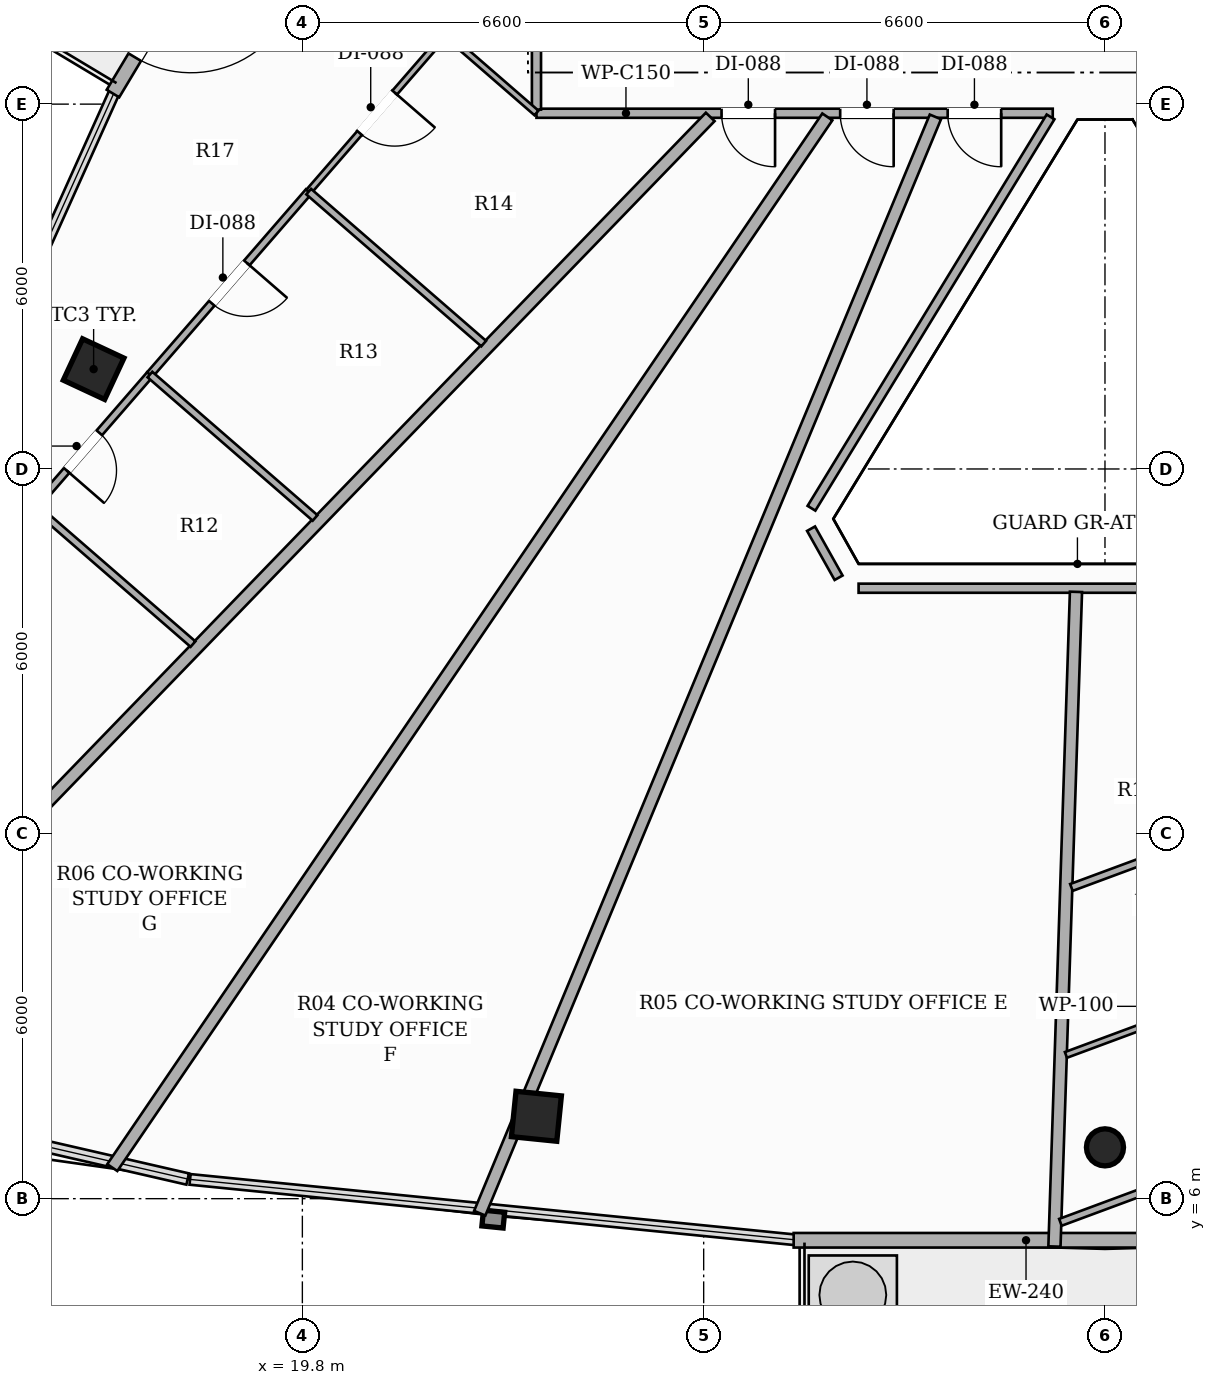
"""IFC4 building model, lengths in metres.
Left out: names, types, materials, properties, quantities, classifications, styles, units other than length and angle.
Written with IfcOpenShell. Run it as: python <this file> out.ifc"""

import sys

from ifc_helpers import new_model, si_unit, direction, frame, frame_2d, origin, origin_2d, place, context, subcontext, project, spatial, rectangle, hollow_rectangle, hollow_circle, extrude, element, fill, save


model = new_model("IFC4")
c1 = context("Model", 3, precision=1e-05, world=origin(), true_north=direction((0.0, 1.0)))
c2 = subcontext(c1, "Body", "Model", "MODEL_VIEW")
j1 = project(units=[si_unit("LENGTHUNIT", "METRE"), si_unit("PLANEANGLEUNIT", "RADIAN")], contexts=[c1])
p1 = place(None, origin())
s1 = spatial("IfcSite", under=j1, at=p1, CompositionType="ELEMENT")
p2 = place(p1, origin())
s2 = spatial("IfcBuilding", under=s1, at=p2, CompositionType="ELEMENT")
p3 = place(p2, frame((0.0, 0.0, 240.35)))
s3 = spatial("IfcBuildingStorey", under=s2, at=p3, CompositionType="ELEMENT", Elevation=240.35)
for number, where, z_axis, x_axis in (
    (1, (16.367, 19.642, 0.0), (0.0, 0.0, 1.0), (0.423, 0.906, 0.0)),
    (2, (23.649, 7.355, 0.0), (0.0, 0.0, 1.0), (-0.995, 0.101, 0.0)),
):
    element("IfcColumn", number, at=place(p3, frame(where, z_axis=z_axis, x_axis=x_axis)), inside=s3, PredefinedType="COLUMN", context=c2, shape_type="SweptSolid", body=[
        extrude(hollow_rectangle(XDim=0.75, YDim=0.75, WallThickness=0.025, at=origin_2d()), origin(), (0.0, 0.0, 1.0), 3.3),
    ])
p4 = place(p3, frame((33.0, 6.844, 0.0), z_axis=(0.0, 0.0, 1.0), x_axis=(1.0, 0.0, 0.0)))
e3 = element("IfcColumn", 3, at=p4, inside=s3, PredefinedType="COLUMN", context=c2, shape_type="SweptSolid", body=[
    extrude(hollow_circle(Radius=0.305, WallThickness=0.016, at=origin_2d()), origin(), (0.0, 0.0, 1.0), 3.3),
])
p5 = place(p3, frame((21.775, 32.66, 0.0), z_axis=(0.0, 0.0, 1.0), x_axis=(-0.514372387577, -0.857566934354, 0.0)))
e4 = element("IfcWall", 4, at=p5, inside=s3, PredefinedType="SOLIDWALL", context=c2, shape_type="SweptSolid", body=[
    extrude(rectangle(XDim=9.895, YDim=0.24, at=frame_2d((4.948, 0.0))), origin(), (0.0, 0.0, 1.0), 2.624),
])
p6 = place(p5, frame((7.398, 0.0, 0.0)))
e5 = element("IfcOpeningElement", 5, at=p6, cuts=e4, PredefinedType="OPENING", context=c2, shape_type="SweptSolid", body=[
    extrude(rectangle(XDim=1.8, YDim=2.2, at=frame_2d((0.9, 1.1))), frame((0.0, 0.13, 0.0), z_axis=(0.0, -1.0, 0.0), x_axis=(1.0, 0.0, 0.0)), (0.0, 0.0, 1.0), 0.26),
])
p7 = place(p3, frame((27.88, 5.316, 0.0), z_axis=(0.0, 0.0, 1.0), x_axis=(1.0, 0.0, 0.0)))
e6 = element("IfcWall", 6, at=p7, inside=s3, PredefinedType="SOLIDWALL", context=c2, shape_type="SweptSolid", body=[
    extrude(rectangle(XDim=10.24, YDim=0.24, at=frame_2d((5.12, 0.0))), origin(), (0.0, 0.0, 1.0), 2.624),
])
p8 = place(p7, frame((7.743, 0.0, 0.0)))
e7 = element("IfcOpeningElement", 7, at=p8, cuts=e6, PredefinedType="OPENING", context=c2, shape_type="SweptSolid", body=[
    extrude(rectangle(XDim=1.8, YDim=2.2, at=frame_2d((0.9, 1.1))), frame((0.0, 0.13, 0.0), z_axis=(0.0, -1.0, 0.0), x_axis=(1.0, 0.0, 0.0)), (0.0, 0.0, 1.0), 0.26),
])
p9 = place(p3, frame((32.141, 23.85, 0.0), z_axis=(0.0, 0.0, 1.0), x_axis=(-1.0, 0.0, 0.0)))
e8 = element("IfcWall", 8, at=p9, inside=s3, PredefinedType="PARTITIONING", context=c2, shape_type="SweptSolid", body=[
    extrude(rectangle(XDim=8.491, YDim=0.15, at=frame_2d((4.246, 0.0))), origin(), (0.0, 0.0, 1.0), 2.565),
])
p10 = place(p9, frame((0.848, 0.0, 0.0)))
e9 = element("IfcOpeningElement", 9, at=p10, cuts=e8, PredefinedType="OPENING", context=c2, shape_type="SweptSolid", body=[
    extrude(rectangle(XDim=0.88, YDim=2.1, at=frame_2d((0.44, 1.05))), frame((0.0, 0.085, 0.0), z_axis=(0.0, -1.0, 0.0), x_axis=(1.0, 0.0, 0.0)), (0.0, 0.0, 1.0), 0.17),
])
p11 = place(p9, frame((2.616, 0.0, 0.0)))
e10 = element("IfcOpeningElement", 10, at=p11, cuts=e8, PredefinedType="OPENING", context=c2, shape_type="SweptSolid", body=[
    extrude(rectangle(XDim=0.88, YDim=2.1, at=frame_2d((0.44, 1.05))), frame((0.0, 0.085, 0.0), z_axis=(0.0, -1.0, 0.0), x_axis=(1.0, 0.0, 0.0)), (0.0, 0.0, 1.0), 0.17),
])
p12 = place(p9, frame((4.567, 0.0, 0.0)))
e11 = element("IfcOpeningElement", 11, at=p12, cuts=e8, PredefinedType="OPENING", context=c2, shape_type="SweptSolid", body=[
    extrude(rectangle(XDim=0.88, YDim=2.1, at=frame_2d((0.44, 1.05))), frame((0.0, 0.085, 0.0), z_axis=(0.0, -1.0, 0.0), x_axis=(1.0, 0.0, 0.0)), (0.0, 0.0, 1.0), 0.17),
])
p13 = place(p3, frame((23.65, 23.91, 0.0), z_axis=(0.0, 0.0, 1.0), x_axis=(0.0, 1.0, 0.0)))
e12 = element("IfcWall", 12, at=p13, inside=s3, PredefinedType="PARTITIONING", context=c2, shape_type="SweptSolid", body=[
    extrude(rectangle(XDim=11.337, YDim=0.15, at=frame_2d((5.668, 0.0))), origin(), (0.0, 0.0, 1.0), 2.492),
])
p14 = place(p13, frame((4.694, 0.0, 0.0)))
e13 = element("IfcOpeningElement", 13, at=p14, cuts=e12, PredefinedType="OPENING", context=c2, shape_type="SweptSolid", body=[
    extrude(rectangle(XDim=0.92, YDim=2.15, at=frame_2d((0.46, 1.075))), frame((0.0, 0.085, 0.0), z_axis=(0.0, -1.0, 0.0), x_axis=(1.0, 0.0, 0.0)), (0.0, 0.0, 1.0), 0.17),
])
p15 = place(p3, frame((37.052, 16.039, 0.0), z_axis=(0.0, 0.0, 1.0), x_axis=(-1.0, 0.0, 0.0)))
e14 = element("IfcWall", 14, at=p15, inside=s3, PredefinedType="PARTITIONING", context=c2, shape_type="SweptSolid", body=[
    extrude(rectangle(XDim=8.104, YDim=0.15, at=frame_2d((4.052, 0.0))), origin(), (0.0, 0.0, 1.0), 2.773),
])
p16 = place(p3, frame((28.619, 16.211, 0.0), z_axis=(0.0, 0.0, 1.0), x_axis=(-0.489334167997, 0.872096366252, 0.0)))
e15 = element("IfcWall", 15, at=p16, inside=s3, PredefinedType="PARTITIONING", context=c2, shape_type="SweptSolid", body=[
    extrude(rectangle(XDim=0.926, YDim=0.15, at=frame_2d((0.463, 0.0))), origin(), (0.0, 0.0, 1.0), 3.06),
])
p17 = place(p3, frame((28.173, 17.354, 0.0), z_axis=(0.0, 0.0, 1.0), x_axis=(0.521329541742, 0.85335544113, 0.0)))
e16 = element("IfcWall", 16, at=p17, inside=s3, PredefinedType="PARTITIONING", context=c2, shape_type="SweptSolid", body=[
    extrude(rectangle(XDim=7.542, YDim=0.15, at=frame_2d((3.771, 0.0))), origin(), (0.0, 0.0, 1.0), 2.773),
])
p18 = place(p3, frame((32.169, 5.213, 0.0), z_axis=(0.0, 0.0, 1.0), x_axis=(0.032863548895, 0.999459847695, 0.0)))
e17 = element("IfcWall", 17, at=p18, inside=s3, PredefinedType="PARTITIONING", context=c2, shape_type="SweptSolid", body=[
    extrude(rectangle(XDim=10.772, YDim=0.2, at=frame_2d((5.386, 0.0))), origin(), (0.0, 0.0, 1.0), 2.492),
])
p19 = place(p3, frame((26.508, 23.79, 0.0), z_axis=(0.0, 0.0, 1.0), x_axis=(-0.695365551949, -0.71865621069, 0.0)))
e18 = element("IfcWall", 18, at=p19, inside=s3, PredefinedType="PARTITIONING", context=c2, shape_type="SweptSolid", body=[
    extrude(rectangle(XDim=21.981, YDim=0.2, at=frame_2d((10.991, 0.0))), origin(), (0.0, 0.0, 1.0), 2.492),
])
p20 = place(p3, frame((22.717, 5.761, 0.0), z_axis=(0.0, 0.0, 1.0), x_axis=(0.383820587854, 0.923407686961, 0.0)))
e19 = element("IfcWall", 19, at=p20, inside=s3, PredefinedType="PARTITIONING", context=c2, shape_type="SweptSolid", body=[
    extrude(rectangle(XDim=19.524, YDim=0.2, at=frame_2d((9.762, 0.0))), origin(), (0.0, 0.0, 1.0), 2.492),
])
p21 = place(p3, frame((16.674, 6.511, 0.0), z_axis=(0.0, 0.0, 1.0), x_axis=(0.562645442508, 0.82669831621, 0.0)))
e20 = element("IfcWall", 20, at=p21, inside=s3, PredefinedType="PARTITIONING", context=c2, shape_type="SweptSolid", body=[
    extrude(rectangle(XDim=20.901, YDim=0.2, at=frame_2d((10.451, 0.0))), origin(), (0.0, 0.0, 1.0), 2.492),
])
p22 = place(p3, frame((35.781, 12.353, 0.0), z_axis=(0.0, 0.0, 1.0), x_axis=(-0.937688263894, -0.347477653607, 0.0)))
e21 = element("IfcWall", 21, at=p22, inside=s3, PredefinedType="PARTITIONING", context=c2, shape_type="SweptSolid", body=[
    extrude(rectangle(XDim=3.554, YDim=0.12, at=frame_2d((1.777, 0.0))), origin(), (0.0, 0.0, 1.0), 2.773),
])
p23 = place(p3, frame((32.267, 5.611, 0.0), z_axis=(0.0, 0.0, 1.0), x_axis=(0.937641120959, 0.347604845027, 0.0)))
e22 = element("IfcWall", 22, at=p23, inside=s3, PredefinedType="PARTITIONING", context=c2, shape_type="SweptSolid", body=[
    extrude(rectangle(XDim=5.638, YDim=0.12, at=frame_2d((2.819, 0.0))), origin(), (0.0, 0.0, 1.0), 2.492),
])
p24 = place(p3, frame((32.358, 8.364, 0.0), z_axis=(0.0, 0.0, 1.0), x_axis=(0.937636593966, 0.34761705605, 0.0)))
e23 = element("IfcWall", 23, at=p24, inside=s3, PredefinedType="PARTITIONING", context=c2, shape_type="SweptSolid", body=[
    extrude(rectangle(XDim=4.597, YDim=0.1, at=frame_2d((2.298, 0.0))), origin(), (0.0, 0.0, 1.0), 2.773),
])
p25 = place(p3, frame((17.293, 19.553, 0.0), z_axis=(0.0, 0.0, 1.0), x_axis=(-0.655555788219, -0.755146746357, 0.0)))
e24 = element("IfcWall", 24, at=p25, inside=s3, PredefinedType="PARTITIONING", context=c2, shape_type="SweptSolid", body=[
    extrude(rectangle(XDim=2.883, YDim=0.12, at=frame_2d((1.441, 0.0))), origin(), (0.0, 0.0, 1.0), 2.492),
])
p26 = place(p25, frame((1.269, 0.0, 0.0)))
e25 = element("IfcOpeningElement", 25, at=p26, cuts=e24, PredefinedType="OPENING", context=c2, shape_type="SweptSolid", body=[
    extrude(rectangle(XDim=0.82, YDim=2.1, at=frame_2d((0.41, 1.05))), frame((0.0, 0.07, 0.0), z_axis=(0.0, -1.0, 0.0), x_axis=(1.0, 0.0, 0.0)), (0.0, 0.0, 1.0), 0.14),
])
p27 = place(p3, frame((19.904, 22.561, 0.0), z_axis=(0.0, 0.0, 1.0), x_axis=(-0.655518370372, -0.755179227803, 0.0)))
e26 = element("IfcWall", 26, at=p27, inside=s3, PredefinedType="PARTITIONING", context=c2, shape_type="SweptSolid", body=[
    extrude(rectangle(XDim=3.983, YDim=0.12, at=frame_2d((1.992, 0.0))), origin(), (0.0, 0.0, 1.0), 2.773),
])
p28 = place(p27, frame((1.552, 0.0, 0.0)))
e27 = element("IfcOpeningElement", 27, at=p28, cuts=e26, PredefinedType="OPENING", context=c2, shape_type="SweptSolid", body=[
    extrude(rectangle(XDim=0.88, YDim=2.1, at=frame_2d((0.44, 1.05))), frame((0.0, 0.07, 0.0), z_axis=(0.0, -1.0, 0.0), x_axis=(1.0, 0.0, 0.0)), (0.0, 0.0, 1.0), 0.14),
])
p29 = place(p3, frame((23.65, 23.855, 0.0), z_axis=(0.0, 0.0, 1.0), x_axis=(-0.755054003076, 0.655662605643, 0.0)))
e28 = element("IfcWall", 28, at=p29, inside=s3, PredefinedType="PARTITIONING", context=c2, shape_type="SweptSolid", body=[
    extrude(rectangle(XDim=1.98, YDim=0.1, at=frame_2d((0.99, 0.0))), origin(), (0.0, 0.0, 1.0), 2.773),
])
p30 = place(p3, frame((22.155, 25.153, 0.0), z_axis=(0.0, 0.0, 1.0), x_axis=(-0.655685588572, -0.755034044888, 0.0)))
e29 = element("IfcWall", 29, at=p30, inside=s3, PredefinedType="PARTITIONING", context=c2, shape_type="SweptSolid", body=[
    extrude(rectangle(XDim=3.433, YDim=0.1, at=frame_2d((1.717, 0.0))), origin(), (0.0, 0.0, 1.0), 2.773),
])
p31 = place(p30, frame((1.276, 0.0, 0.0)))
e30 = element("IfcOpeningElement", 30, at=p31, cuts=e29, PredefinedType="OPENING", context=c2, shape_type="SweptSolid", body=[
    extrude(rectangle(XDim=0.88, YDim=2.1, at=frame_2d((0.44, 1.05))), frame((0.0, 0.06, 0.0), z_axis=(0.0, -1.0, 0.0), x_axis=(1.0, 0.0, 0.0)), (0.0, 0.0, 1.0), 0.12),
])
p32 = place(p3, frame((17.293, 19.553, 0.0), z_axis=(0.0, 0.0, 1.0), x_axis=(0.755140110276, -0.655563432364, 0.0)))
e31 = element("IfcWall", 31, at=p32, inside=s3, PredefinedType="PARTITIONING", context=c2, shape_type="SweptSolid", body=[
    extrude(rectangle(XDim=3.597, YDim=0.12, at=frame_2d((1.798, 0.0))), origin(), (0.0, 0.0, 1.0), 2.565),
])
p33 = place(p3, frame((18.001, 15.12, 0.0), z_axis=(0.0, 0.0, 1.0), x_axis=(-0.755063624175, 0.655651525925, 0.0)))
e32 = element("IfcWall", 32, at=p33, inside=s3, PredefinedType="PARTITIONING", context=c2, shape_type="SweptSolid", body=[
    extrude(rectangle(XDim=3.441, YDim=0.12, at=frame_2d((1.72, 0.0))), origin(), (0.0, 0.0, 1.0), 2.492),
])
p34 = place(p3, frame((19.904, 22.561, 0.0), z_axis=(0.0, 0.0, 1.0), x_axis=(0.755063159293, -0.655652061293, 0.0)))
e33 = element("IfcWall", 33, at=p34, inside=s3, PredefinedType="PARTITIONING", context=c2, shape_type="SweptSolid", body=[
    extrude(rectangle(XDim=3.812, YDim=0.12, at=frame_2d((1.906, 0.0))), origin(), (0.0, 0.0, 1.0), 2.565),
])
p35 = place(p6, origin())
e34 = element("IfcDoor", 34, at=p35, inside=s3, OperationType="SINGLE_SWING_LEFT", PredefinedType="DOOR", context=c2, shape_type="SweptSolid", body=[
    extrude(rectangle(XDim=1.8, YDim=2.2, at=frame_2d((0.9, 1.1))), frame((0.0, 0.025, 0.0), z_axis=(0.0, -1.0, 0.0), x_axis=(1.0, 0.0, 0.0)), (0.0, 0.0, 1.0), 0.05),
])
fill(e5, e34)
p36 = place(p26, origin())
e35 = element("IfcDoor", 35, at=p36, inside=s3, OperationType="SINGLE_SWING_RIGHT", PredefinedType="DOOR", context=c2, shape_type="SweptSolid", body=[
    extrude(rectangle(XDim=0.82, YDim=2.1, at=frame_2d((0.41, 1.05))), frame((0.0, 0.025, 0.0), z_axis=(0.0, -1.0, 0.0), x_axis=(1.0, 0.0, 0.0)), (0.0, 0.0, 1.0), 0.05),
])
fill(e25, e35)
p37 = place(p28, origin())
e36 = element("IfcDoor", 36, at=p37, inside=s3, OperationType="SINGLE_SWING_LEFT", PredefinedType="DOOR", context=c2, shape_type="SweptSolid", body=[
    extrude(rectangle(XDim=0.88, YDim=2.1, at=frame_2d((0.44, 1.05))), frame((0.0, 0.025, 0.0), z_axis=(0.0, -1.0, 0.0), x_axis=(1.0, 0.0, 0.0)), (0.0, 0.0, 1.0), 0.05),
])
fill(e27, e36)
p38 = place(p31, origin())
e37 = element("IfcDoor", 37, at=p38, inside=s3, OperationType="SINGLE_SWING_LEFT", PredefinedType="DOOR", context=c2, shape_type="SweptSolid", body=[
    extrude(rectangle(XDim=0.88, YDim=2.1, at=frame_2d((0.44, 1.05))), frame((0.0, 0.025, 0.0), z_axis=(0.0, -1.0, 0.0), x_axis=(1.0, 0.0, 0.0)), (0.0, 0.0, 1.0), 0.05),
])
fill(e30, e37)
p39 = place(p10, origin())
e38 = element("IfcDoor", 38, at=p39, inside=s3, OperationType="SINGLE_SWING_LEFT", PredefinedType="DOOR", context=c2, shape_type="SweptSolid", body=[
    extrude(rectangle(XDim=0.88, YDim=2.1, at=frame_2d((0.44, 1.05))), frame((0.0, 0.025, 0.0), z_axis=(0.0, -1.0, 0.0), x_axis=(1.0, 0.0, 0.0)), (0.0, 0.0, 1.0), 0.05),
])
fill(e9, e38)
p40 = place(p11, origin())
e39 = element("IfcDoor", 39, at=p40, inside=s3, OperationType="SINGLE_SWING_LEFT", PredefinedType="DOOR", context=c2, shape_type="SweptSolid", body=[
    extrude(rectangle(XDim=0.88, YDim=2.1, at=frame_2d((0.44, 1.05))), frame((0.0, 0.025, 0.0), z_axis=(0.0, -1.0, 0.0), x_axis=(1.0, 0.0, 0.0)), (0.0, 0.0, 1.0), 0.05),
])
fill(e10, e39)
p41 = place(p12, origin())
e40 = element("IfcDoor", 40, at=p41, inside=s3, OperationType="SINGLE_SWING_LEFT", PredefinedType="DOOR", context=c2, shape_type="SweptSolid", body=[
    extrude(rectangle(XDim=0.88, YDim=2.1, at=frame_2d((0.44, 1.05))), frame((0.0, 0.025, 0.0), z_axis=(0.0, -1.0, 0.0), x_axis=(1.0, 0.0, 0.0)), (0.0, 0.0, 1.0), 0.05),
])
fill(e11, e40)
save(model, sys.argv[1])
